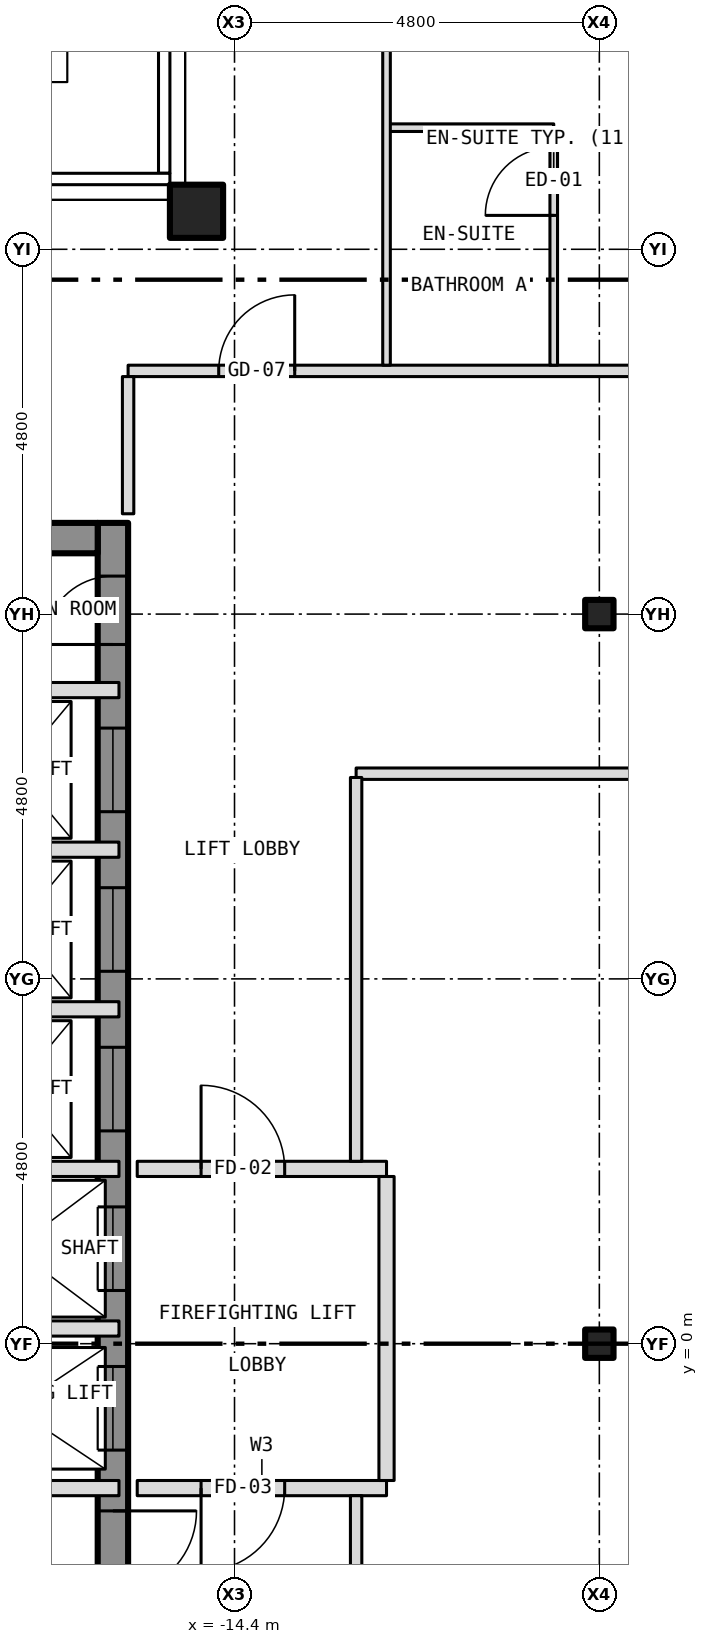
"""IFC4 building model, lengths in metres.
Left out: names, types, materials, properties, quantities, classifications, styles, units other than length and angle.
Written with IfcOpenShell. Run it as: python <this file> out.ifc"""

import sys

from ifc_helpers import new_model, si_unit, direction, frame, frame_2d, origin, origin_2d, place, context, subcontext, project, spatial, rectangle, hollow_rectangle, i_section, extrude, element, fill, save


model = new_model("IFC4")
c1 = context("Model", 3, precision=1e-05, world=origin(), true_north=direction((0.0, 1.0)))
c2 = subcontext(c1, "Body", "Model", "MODEL_VIEW")
j1 = project(units=[si_unit("LENGTHUNIT", "METRE"), si_unit("PLANEANGLEUNIT", "RADIAN")], contexts=[c1])
p1 = place(None, origin())
s1 = spatial("IfcSite", under=j1, at=p1, CompositionType="ELEMENT")
p2 = place(p1, origin())
s2 = spatial("IfcBuilding", under=s1, at=p2, CompositionType="ELEMENT")
p3 = place(p2, frame((0.0, 0.0, 191.0)))
s3 = spatial("IfcBuildingStorey", under=s2, at=p3, CompositionType="ELEMENT", Elevation=191.0)
p4 = place(p3, frame((-14.9, 14.9, -0.15), z_axis=(0.0, 0.0, 1.0), x_axis=(1.0, 0.0, 0.0)))
e1 = element("IfcColumn", 1, at=p4, inside=s3, PredefinedType="COLUMN", context=c2, shape_type="SweptSolid", body=[
    extrude(hollow_rectangle(XDim=0.7, YDim=0.7, WallThickness=0.04, at=origin_2d()), origin(), (0.0, 0.0, 1.0), 3.5),
])
for number, where, z_axis, x_axis in (
    (2, (-9.6, 0.0, -0.15), (0.0, 0.0, 1.0), (1.0, 0.0, 0.0)),
    (3, (-9.6, 9.6, -0.15), (0.0, 0.0, 1.0), (1.0, 0.0, 0.0)),
):
    element("IfcColumn", number, at=place(p3, frame(where, z_axis=z_axis, x_axis=x_axis)), inside=s3, PredefinedType="COLUMN", context=c2, shape_type="SweptSolid", body=[
        extrude(i_section(OverallWidth=0.373, OverallDepth=0.373, WebThickness=0.016, FlangeThickness=0.026, at=origin_2d()), origin(), (0.0, 0.0, 1.0), 3.5),
    ])
p5 = place(p3, frame((-16.0, -10.8, 0.0), z_axis=(0.0, 0.0, 1.0), x_axis=(0.0, 1.0, 0.0)))
e4 = element("IfcWall", 4, at=p5, inside=s3, PredefinedType="SHEAR", context=c2, shape_type="SweptSolid", body=[
    extrude(rectangle(XDim=21.6, YDim=0.4, at=frame_2d((10.8, 0.0))), origin(), (0.0, 0.0, 1.0), 3.25),
])
p6 = place(p5, frame((9.4, 0.0, 0.0)))
e5 = element("IfcOpeningElement", 5, at=p6, cuts=e4, PredefinedType="OPENING", context=c2, shape_type="SweptSolid", body=[
    extrude(rectangle(XDim=1.1, YDim=2.1, at=frame_2d((0.55, 1.05))), frame((0.0, 0.212, 0.0), z_axis=(0.0, -1.0, 0.0), x_axis=(1.0, 0.0, 0.0)), (0.0, 0.0, 1.0), 0.424),
])
p7 = place(p5, frame((11.5, 0.0, 0.0)))
e6 = element("IfcOpeningElement", 6, at=p7, cuts=e4, PredefinedType="OPENING", context=c2, shape_type="SweptSolid", body=[
    extrude(rectangle(XDim=1.1, YDim=2.1, at=frame_2d((0.55, 1.05))), frame((0.0, 0.212, 0.0), z_axis=(0.0, -1.0, 0.0), x_axis=(1.0, 0.0, 0.0)), (0.0, 0.0, 1.0), 0.424),
])
p8 = place(p5, frame((13.6, 0.0, 0.0)))
e7 = element("IfcOpeningElement", 7, at=p8, cuts=e4, PredefinedType="OPENING", context=c2, shape_type="SweptSolid", body=[
    extrude(rectangle(XDim=1.1, YDim=2.1, at=frame_2d((0.55, 1.05))), frame((0.0, 0.212, 0.0), z_axis=(0.0, -1.0, 0.0), x_axis=(1.0, 0.0, 0.0)), (0.0, 0.0, 1.0), 0.424),
])
p9 = place(p5, frame((15.7, 0.0, 0.0)))
e8 = element("IfcOpeningElement", 8, at=p9, cuts=e4, PredefinedType="OPENING", context=c2, shape_type="SweptSolid", body=[
    extrude(rectangle(XDim=1.1, YDim=2.1, at=frame_2d((0.55, 1.05))), frame((0.0, 0.212, 0.0), z_axis=(0.0, -1.0, 0.0), x_axis=(1.0, 0.0, 0.0)), (0.0, 0.0, 1.0), 0.424),
])
p10 = place(p5, frame((17.8, 0.0, 0.0)))
e9 = element("IfcOpeningElement", 9, at=p10, cuts=e4, PredefinedType="OPENING", context=c2, shape_type="SweptSolid", body=[
    extrude(rectangle(XDim=1.1, YDim=2.1, at=frame_2d((0.55, 1.05))), frame((0.0, 0.212, 0.0), z_axis=(0.0, -1.0, 0.0), x_axis=(1.0, 0.0, 0.0)), (0.0, 0.0, 1.0), 0.424),
])
p11 = place(p5, frame((0.458, 0.0, 0.0)))
e10 = element("IfcOpeningElement", 10, at=p11, cuts=e4, PredefinedType="OPENING", context=c2, shape_type="SweptSolid", body=[
    extrude(rectangle(XDim=1.1, YDim=2.1, at=frame_2d((0.55, 1.05))), frame((0.0, 0.212, 0.0), z_axis=(0.0, -1.0, 0.0), x_axis=(1.0, 0.0, 0.0)), (0.0, 0.0, 1.0), 0.424),
])
p12 = place(p5, frame((7.5, 0.0, 0.0)))
e11 = element("IfcOpeningElement", 11, at=p12, cuts=e4, PredefinedType="OPENING", context=c2, shape_type="SweptSolid", body=[
    extrude(rectangle(XDim=1.1, YDim=2.1, at=frame_2d((0.55, 1.05))), frame((0.0, 0.212, 0.0), z_axis=(0.0, -1.0, 0.0), x_axis=(1.0, 0.0, 0.0)), (0.0, 0.0, 1.0), 0.424),
])
p13 = place(p5, frame((20.0, 0.0, 0.0)))
e12 = element("IfcOpeningElement", 12, at=p13, cuts=e4, PredefinedType="OPENING", context=c2, shape_type="SweptSolid", body=[
    extrude(rectangle(XDim=0.9, YDim=2.1, at=frame_2d((0.45, 1.05))), frame((0.0, 0.212, 0.0), z_axis=(0.0, -1.0, 0.0), x_axis=(1.0, 0.0, 0.0)), (0.0, 0.0, 1.0), 0.424),
])
p14 = place(p3, frame((-20.0, 10.6, 0.0), z_axis=(0.0, 0.0, 1.0), x_axis=(1.0, 0.0, 0.0)))
e13 = element("IfcWall", 13, at=p14, inside=s3, PredefinedType="SHEAR", context=c2, shape_type="SweptSolid", body=[
    extrude(rectangle(XDim=3.8, YDim=0.4, at=frame_2d((1.9, 0.0))), origin(), (0.0, 0.0, 1.0), 3.25),
])
p15 = place(p3, frame((-20.28, -1.9, 0.0), z_axis=(0.0, 0.0, 1.0), x_axis=(1.0, 0.0, 0.0)))
e14 = element("IfcWall", 14, at=p15, inside=s3, PredefinedType="PARTITIONING", context=c2, shape_type="SweptSolid", body=[
    extrude(rectangle(XDim=4.36, YDim=0.2, at=frame_2d((2.18, 0.0))), origin(), (0.0, 0.0, 1.0), 3.25),
])
p16 = place(p15, frame((0.28, 0.0, 0.0)))
e15 = element("IfcOpeningElement", 15, at=p16, cuts=e14, PredefinedType="OPENING", context=c2, shape_type="SweptSolid", body=[
    extrude(rectangle(XDim=0.9, YDim=2.1, at=frame_2d((0.45, 1.05))), frame((0.0, 0.112, 0.0), z_axis=(0.0, -1.0, 0.0), x_axis=(1.0, 0.0, 0.0)), (0.0, 0.0, 1.0), 0.224),
])
p17 = place(p3, frame((-15.68, -1.9, 0.0), z_axis=(0.0, 0.0, 1.0), x_axis=(1.0, 0.0, 0.0)))
e16 = element("IfcWall", 16, at=p17, inside=s3, PredefinedType="PARTITIONING", context=c2, shape_type="SweptSolid", body=[
    extrude(rectangle(XDim=3.28, YDim=0.2, at=frame_2d((1.64, 0.0))), origin(), (0.0, 0.0, 1.0), 3.35),
])
p18 = place(p17, frame((0.84, 0.0, 0.0)))
e17 = element("IfcOpeningElement", 17, at=p18, cuts=e16, PredefinedType="OPENING", context=c2, shape_type="SweptSolid", body=[
    extrude(rectangle(XDim=1.1, YDim=2.1, at=frame_2d((0.55, 1.05))), frame((0.0, 0.112, 0.0), z_axis=(0.0, -1.0, 0.0), x_axis=(1.0, 0.0, 0.0)), (0.0, 0.0, 1.0), 0.224),
])
for number, where, z_axis, x_axis in (
    (18, (-18.8, 0.2, 0.0), (0.0, 0.0, 1.0), (1.0, 0.0, 0.0)),
    (19, (-18.8, 2.3, 0.0), (0.0, 0.0, 1.0), (1.0, 0.0, 0.0)),
):
    element("IfcWall", number, at=place(p3, frame(where, z_axis=z_axis, x_axis=x_axis)), inside=s3, PredefinedType="PARTITIONING", context=c2, shape_type="SweptSolid", body=[
        extrude(rectangle(XDim=2.88, YDim=0.2, at=frame_2d((1.44, 0.0))), origin(), (0.0, 0.0, 1.0), 3.25),
    ])
p19 = place(p3, frame((-15.68, 2.3, 0.0), z_axis=(0.0, 0.0, 1.0), x_axis=(1.0, 0.0, 0.0)))
e20 = element("IfcWall", 20, at=p19, inside=s3, PredefinedType="PARTITIONING", context=c2, shape_type="SweptSolid", body=[
    extrude(rectangle(XDim=3.28, YDim=0.2, at=frame_2d((1.64, 0.0))), origin(), (0.0, 0.0, 1.0), 3.35),
])
p20 = place(p19, frame((0.84, 0.0, 0.0)))
e21 = element("IfcOpeningElement", 21, at=p20, cuts=e20, PredefinedType="OPENING", context=c2, shape_type="SweptSolid", body=[
    extrude(rectangle(XDim=1.1, YDim=2.1, at=frame_2d((0.55, 1.05))), frame((0.0, 0.112, 0.0), z_axis=(0.0, -1.0, 0.0), x_axis=(1.0, 0.0, 0.0)), (0.0, 0.0, 1.0), 0.224),
])
for number, where, z_axis, x_axis in (
    (22, (-18.8, 4.4, 0.0), (0.0, 0.0, 1.0), (1.0, 0.0, 0.0)),
    (23, (-18.8, 6.5, 0.0), (0.0, 0.0, 1.0), (1.0, 0.0, 0.0)),
):
    element("IfcWall", number, at=place(p3, frame(where, z_axis=z_axis, x_axis=x_axis)), inside=s3, PredefinedType="PARTITIONING", context=c2, shape_type="SweptSolid", body=[
        extrude(rectangle(XDim=2.88, YDim=0.2, at=frame_2d((1.44, 0.0))), origin(), (0.0, 0.0, 1.0), 3.25),
    ])
p21 = place(p3, frame((-12.8, 7.5, 0.0), z_axis=(0.0, 0.0, 1.0), x_axis=(1.0, 0.0, 0.0)))
e24 = element("IfcWall", 24, at=p21, inside=s3, PredefinedType="PARTITIONING", context=c2, shape_type="SweptSolid", body=[
    extrude(rectangle(XDim=20.3, YDim=0.15, at=frame_2d((10.15, 0.0))), origin(), (0.0, 0.0, 1.0), 3.35),
])
p22 = place(p21, frame((5.95, 0.0, 0.0)))
e25 = element("IfcOpeningElement", 25, at=p22, cuts=e24, PredefinedType="OPENING", context=c2, shape_type="SweptSolid", body=[
    extrude(rectangle(XDim=0.9, YDim=2.1, at=frame_2d((0.45, 1.05))), frame((0.0, 0.087, 0.0), z_axis=(0.0, -1.0, 0.0), x_axis=(1.0, 0.0, 0.0)), (0.0, 0.0, 1.0), 0.174),
])
p23 = place(p3, frame((-20.28, 8.6, 0.0), z_axis=(0.0, 0.0, 1.0), x_axis=(1.0, 0.0, 0.0)))
e26 = element("IfcWall", 26, at=p23, inside=s3, PredefinedType="PARTITIONING", context=c2, shape_type="SweptSolid", body=[
    extrude(rectangle(XDim=4.36, YDim=0.2, at=frame_2d((2.18, 0.0))), origin(), (0.0, 0.0, 1.0), 3.25),
])
p24 = place(p3, frame((-15.8, 12.8, 0.0), z_axis=(0.0, 0.0, 1.0), x_axis=(1.0, 0.0, 0.0)))
e27 = element("IfcWall", 27, at=p24, inside=s3, PredefinedType="PARTITIONING", context=c2, shape_type="SweptSolid", body=[
    extrude(rectangle(XDim=31.6, YDim=0.15, at=frame_2d((15.8, 0.0))), origin(), (0.0, 0.0, 1.0), 3.35),
])
p25 = place(p24, frame((7.708, 0.0, 0.0)))
e28 = element("IfcOpeningElement", 28, at=p25, cuts=e27, PredefinedType="OPENING", context=c2, shape_type="SweptSolid", body=[
    extrude(rectangle(XDim=1.0, YDim=2.1, at=frame_2d((0.5, 1.05))), frame((0.0, 0.087, 0.0), z_axis=(0.0, -1.0, 0.0), x_axis=(1.0, 0.0, 0.0)), (0.0, 0.0, 1.0), 0.174),
])
p26 = place(p24, frame((12.568, 0.0, 0.0)))
e29 = element("IfcOpeningElement", 29, at=p26, cuts=e27, PredefinedType="OPENING", context=c2, shape_type="SweptSolid", body=[
    extrude(rectangle(XDim=1.0, YDim=2.1, at=frame_2d((0.5, 1.05))), frame((0.0, 0.087, 0.0), z_axis=(0.0, -1.0, 0.0), x_axis=(1.0, 0.0, 0.0)), (0.0, 0.0, 1.0), 0.174),
])
p27 = place(p24, frame((22.892, 0.0, 0.0)))
e30 = element("IfcOpeningElement", 30, at=p27, cuts=e27, PredefinedType="OPENING", context=c2, shape_type="SweptSolid", body=[
    extrude(rectangle(XDim=1.0, YDim=2.1, at=frame_2d((0.5, 1.05))), frame((0.0, 0.087, 0.0), z_axis=(0.0, -1.0, 0.0), x_axis=(1.0, 0.0, 0.0)), (0.0, 0.0, 1.0), 0.174),
])
p28 = place(p24, frame((1.192, 0.0, 0.0)))
e31 = element("IfcOpeningElement", 31, at=p28, cuts=e27, PredefinedType="OPENING", context=c2, shape_type="SweptSolid", body=[
    extrude(rectangle(XDim=1.0, YDim=2.1, at=frame_2d((0.5, 1.05))), frame((0.0, 0.087, 0.0), z_axis=(0.0, -1.0, 0.0), x_axis=(1.0, 0.0, 0.0)), (0.0, 0.0, 1.0), 0.174),
])
p29 = place(p24, frame((29.409, 0.0, 0.0)))
e32 = element("IfcOpeningElement", 32, at=p29, cuts=e27, PredefinedType="OPENING", context=c2, shape_type="SweptSolid", body=[
    extrude(rectangle(XDim=1.0, YDim=2.1, at=frame_2d((0.5, 1.05))), frame((0.0, 0.087, 0.0), z_axis=(0.0, -1.0, 0.0), x_axis=(1.0, 0.0, 0.0)), (0.0, 0.0, 1.0), 0.174),
])
p30 = place(p3, frame((-12.4, 16.0, 0.0), z_axis=(0.0, 0.0, 1.0), x_axis=(1.0, 0.0, 0.0)))
e33 = element("IfcWall", 33, at=p30, inside=s3, PredefinedType="PARTITIONING", context=c2, shape_type="SweptSolid", body=[
    extrude(rectangle(XDim=2.2, YDim=0.1, at=frame_2d((1.1, 0.0))), origin(), (0.0, 0.0, 1.0), 3.35),
])
p31 = place(p3, frame((-15.8, 10.92, 0.0), z_axis=(0.0, 0.0, 1.0), x_axis=(0.0, 1.0, 0.0)))
e34 = element("IfcWall", 34, at=p31, inside=s3, PredefinedType="PARTITIONING", context=c2, shape_type="SweptSolid", body=[
    extrude(rectangle(XDim=1.805, YDim=0.15, at=frame_2d((0.903, 0.0))), origin(), (0.0, 0.0, 1.0), 3.35),
])
p32 = place(p3, frame((-12.8, -10.525, 0.0), z_axis=(0.0, 0.0, 1.0), x_axis=(0.0, 1.0, 0.0)))
e35 = element("IfcWall", 35, at=p32, inside=s3, PredefinedType="PARTITIONING", context=c2, shape_type="SweptSolid", body=[
    extrude(rectangle(XDim=8.525, YDim=0.15, at=frame_2d((4.262, 0.0))), origin(), (0.0, 0.0, 1.0), 3.35),
])
p33 = place(p3, frame((-12.8, 2.4, 0.0), z_axis=(0.0, 0.0, 1.0), x_axis=(0.0, 1.0, 0.0)))
e36 = element("IfcWall", 36, at=p33, inside=s3, PredefinedType="PARTITIONING", context=c2, shape_type="SweptSolid", body=[
    extrude(rectangle(XDim=5.05, YDim=0.15, at=frame_2d((2.525, 0.0))), origin(), (0.0, 0.0, 1.0), 3.35),
])
p34 = place(p3, frame((-12.4, -1.8, 0.0), z_axis=(0.0, 0.0, 1.0), x_axis=(0.0, 1.0, 0.0)))
e37 = element("IfcWall", 37, at=p34, inside=s3, PredefinedType="PARTITIONING", context=c2, shape_type="SweptSolid", body=[
    extrude(rectangle(XDim=4.0, YDim=0.2, at=frame_2d((2.0, 0.0))), origin(), (0.0, 0.0, 1.0), 3.35),
])
p35 = place(p3, frame((-12.4, 12.875, 0.0), z_axis=(0.0, 0.0, 1.0), x_axis=(0.0, 1.0, 0.0)))
e38 = element("IfcWall", 38, at=p35, inside=s3, PredefinedType="PARTITIONING", context=c2, shape_type="SweptSolid", body=[
    extrude(rectangle(XDim=7.905, YDim=0.1, at=frame_2d((3.953, 0.0))), origin(), (0.0, 0.0, 1.0), 3.35),
])
p36 = place(p3, frame((-10.2, 12.875, 0.0), z_axis=(0.0, 0.0, 1.0), x_axis=(0.0, 1.0, 0.0)))
e39 = element("IfcWall", 39, at=p36, inside=s3, PredefinedType="PARTITIONING", context=c2, shape_type="SweptSolid", body=[
    extrude(rectangle(XDim=3.075, YDim=0.1, at=frame_2d((1.538, 0.0))), origin(), (0.0, 0.0, 1.0), 3.35),
])
p37 = place(p36, frame((1.971, 0.0, 0.0)))
e40 = element("IfcOpeningElement", 40, at=p37, cuts=e39, PredefinedType="OPENING", context=c2, shape_type="SweptSolid", body=[
    extrude(rectangle(XDim=0.9, YDim=2.1, at=frame_2d((0.45, 1.05))), frame((0.0, 0.062, 0.0), z_axis=(0.0, -1.0, 0.0), x_axis=(1.0, 0.0, 0.0)), (0.0, 0.0, 1.0), 0.124),
])
p38 = place(p6, origin())
e41 = element("IfcDoor", 41, at=p38, inside=s3, OperationType="SLIDING_TO_LEFT", PredefinedType="DOOR", context=c2, shape_type="SweptSolid", body=[
    extrude(rectangle(XDim=1.1, YDim=2.1, at=frame_2d((0.55, 1.05))), frame((0.0, 0.025, 0.0), z_axis=(0.0, -1.0, 0.0), x_axis=(1.0, 0.0, 0.0)), (0.0, 0.0, 1.0), 0.05),
])
fill(e5, e41)
p39 = place(p7, origin())
e42 = element("IfcDoor", 42, at=p39, inside=s3, OperationType="SLIDING_TO_LEFT", PredefinedType="DOOR", context=c2, shape_type="SweptSolid", body=[
    extrude(rectangle(XDim=1.1, YDim=2.1, at=frame_2d((0.55, 1.05))), frame((0.0, 0.025, 0.0), z_axis=(0.0, -1.0, 0.0), x_axis=(1.0, 0.0, 0.0)), (0.0, 0.0, 1.0), 0.05),
])
fill(e6, e42)
p40 = place(p8, origin())
e43 = element("IfcDoor", 43, at=p40, inside=s3, OperationType="SLIDING_TO_LEFT", PredefinedType="DOOR", context=c2, shape_type="SweptSolid", body=[
    extrude(rectangle(XDim=1.1, YDim=2.1, at=frame_2d((0.55, 1.05))), frame((0.0, 0.025, 0.0), z_axis=(0.0, -1.0, 0.0), x_axis=(1.0, 0.0, 0.0)), (0.0, 0.0, 1.0), 0.05),
])
fill(e7, e43)
p41 = place(p9, origin())
e44 = element("IfcDoor", 44, at=p41, inside=s3, OperationType="SLIDING_TO_LEFT", PredefinedType="DOOR", context=c2, shape_type="SweptSolid", body=[
    extrude(rectangle(XDim=1.1, YDim=2.1, at=frame_2d((0.55, 1.05))), frame((0.0, 0.025, 0.0), z_axis=(0.0, -1.0, 0.0), x_axis=(1.0, 0.0, 0.0)), (0.0, 0.0, 1.0), 0.05),
])
fill(e8, e44)
p42 = place(p10, origin())
e45 = element("IfcDoor", 45, at=p42, inside=s3, OperationType="SLIDING_TO_LEFT", PredefinedType="DOOR", context=c2, shape_type="SweptSolid", body=[
    extrude(rectangle(XDim=1.1, YDim=2.1, at=frame_2d((0.55, 1.05))), frame((0.0, 0.025, 0.0), z_axis=(0.0, -1.0, 0.0), x_axis=(1.0, 0.0, 0.0)), (0.0, 0.0, 1.0), 0.05),
])
fill(e9, e45)
p43 = place(p12, origin())
e46 = element("IfcDoor", 46, at=p43, inside=s3, OperationType="SINGLE_SWING_RIGHT", PredefinedType="DOOR", context=c2, shape_type="SweptSolid", body=[
    extrude(rectangle(XDim=1.1, YDim=2.1, at=frame_2d((0.55, 1.05))), frame((0.0, 0.025, 0.0), z_axis=(0.0, -1.0, 0.0), x_axis=(1.0, 0.0, 0.0)), (0.0, 0.0, 1.0), 0.05),
])
fill(e11, e46)
p44 = place(p13, origin())
e47 = element("IfcDoor", 47, at=p44, inside=s3, OperationType="SINGLE_SWING_LEFT", PredefinedType="DOOR", context=c2, shape_type="SweptSolid", body=[
    extrude(rectangle(XDim=0.9, YDim=2.1, at=frame_2d((0.45, 1.05))), frame((0.0, 0.025, 0.0), z_axis=(0.0, -1.0, 0.0), x_axis=(1.0, 0.0, 0.0)), (0.0, 0.0, 1.0), 0.05),
])
fill(e12, e47)
p45 = place(p20, origin())
e48 = element("IfcDoor", 48, at=p45, inside=s3, OperationType="SINGLE_SWING_LEFT", PredefinedType="DOOR", context=c2, shape_type="SweptSolid", body=[
    extrude(rectangle(XDim=1.1, YDim=2.1, at=frame_2d((0.55, 1.05))), frame((0.0, 0.025, 0.0), z_axis=(0.0, -1.0, 0.0), x_axis=(1.0, 0.0, 0.0)), (0.0, 0.0, 1.0), 0.05),
])
fill(e21, e48)
p46 = place(p18, origin())
e49 = element("IfcDoor", 49, at=p46, inside=s3, OperationType="SINGLE_SWING_LEFT", PredefinedType="DOOR", context=c2, shape_type="SweptSolid", body=[
    extrude(rectangle(XDim=1.1, YDim=2.1, at=frame_2d((0.55, 1.05))), frame((0.0, 0.025, 0.0), z_axis=(0.0, -1.0, 0.0), x_axis=(1.0, 0.0, 0.0)), (0.0, 0.0, 1.0), 0.05),
])
fill(e17, e49)
p47 = place(p37, origin())
e50 = element("IfcDoor", 50, at=p47, inside=s3, OperationType="SINGLE_SWING_LEFT", PredefinedType="DOOR", context=c2, shape_type="SweptSolid", body=[
    extrude(rectangle(XDim=0.9, YDim=2.1, at=frame_2d((0.45, 1.05))), frame((0.0, 0.025, 0.0), z_axis=(0.0, -1.0, 0.0), x_axis=(1.0, 0.0, 0.0)), (0.0, 0.0, 1.0), 0.05),
])
fill(e40, e50)
p48 = place(p28, origin())
e51 = element("IfcDoor", 51, at=p48, inside=s3, OperationType="SINGLE_SWING_RIGHT", PredefinedType="DOOR", context=c2, shape_type="SweptSolid", body=[
    extrude(rectangle(XDim=1.0, YDim=2.1, at=frame_2d((0.5, 1.05))), frame((0.0, 0.025, 0.0), z_axis=(0.0, -1.0, 0.0), x_axis=(1.0, 0.0, 0.0)), (0.0, 0.0, 1.0), 0.05),
])
fill(e31, e51)
save(model, sys.argv[1])
